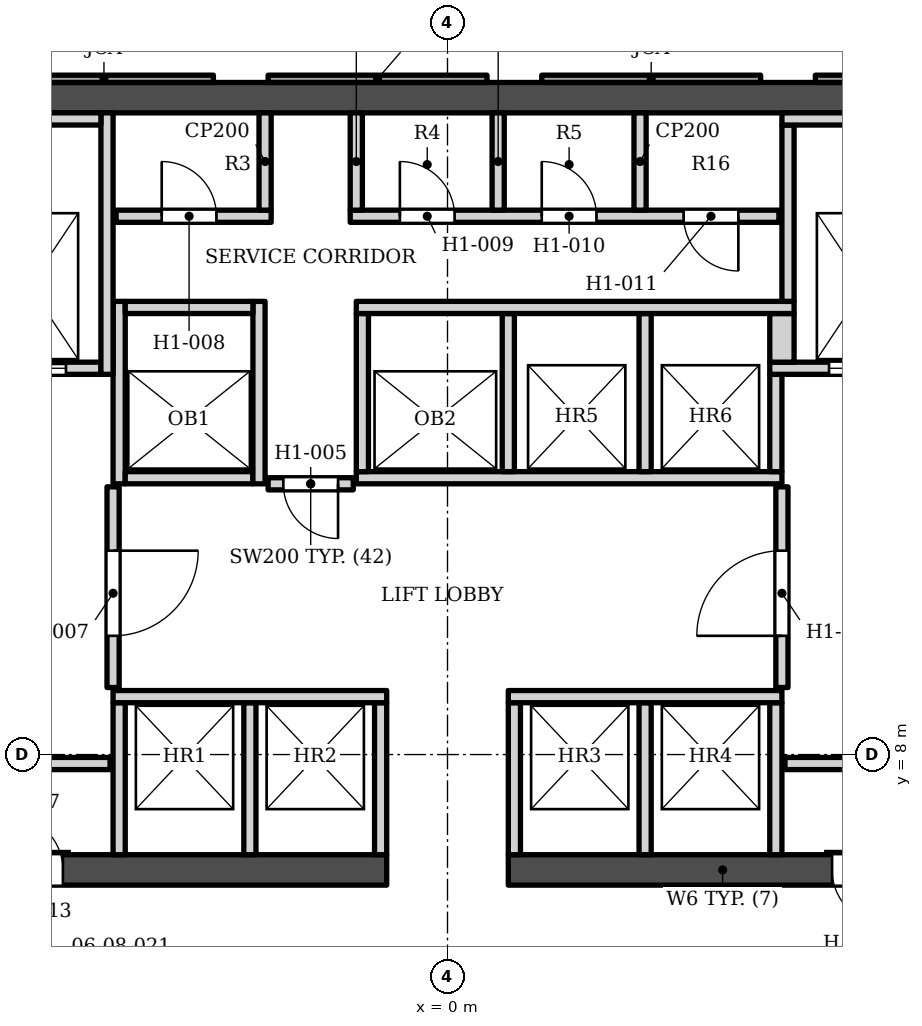
"""IFC4 building model, lengths in metres.
Left out: names, types, materials, properties, quantities, classifications, styles, units other than length and angle.
Written with IfcOpenShell. Run it as: python <this file> out.ifc"""

import sys

from ifc_helpers import new_model, si_unit, direction, frame, frame_2d, origin, place, context, subcontext, project, spatial, polyline, rectangle, outline, extrude, element, fill, save


model = new_model("IFC4")
c1 = context("Model", 3, precision=1e-05, world=origin(), true_north=direction((0.0, 1.0)))
c2 = subcontext(c1, "Body", "Model", "MODEL_VIEW")
j1 = project(units=[si_unit("LENGTHUNIT", "METRE"), si_unit("PLANEANGLEUNIT", "RADIAN")], contexts=[c1])
p1 = place(None, origin())
s1 = spatial("IfcSite", under=j1, at=p1, CompositionType="ELEMENT")
p2 = place(p1, origin())
s2 = spatial("IfcBuilding", under=s1, at=p2, CompositionType="ELEMENT")
p3 = place(p2, frame((0.0, 0.0, 46.0)))
s3 = spatial("IfcBuildingStorey", under=s2, at=p3, CompositionType="ELEMENT", Elevation=46.0)
p4 = place(p3, frame((-16.9, 18.802, 0.0), z_axis=(0.0, 0.0, 1.0), x_axis=(1.0, 0.0, 0.0)))
e1 = element("IfcWall", 1, at=p4, inside=s3, PredefinedType="SHEAR", context=c2, shape_type="SweptSolid", body=[
    extrude(rectangle(XDim=33.8, YDim=0.5, at=frame_2d((16.9, 0.0))), origin(), (0.0, 0.0, 1.0), 3.4),
])
p5 = place(p3, frame((-8.05, 6.103, 0.0), z_axis=(0.0, 0.0, 1.0), x_axis=(1.0, 0.0, 0.0)))
e2 = element("IfcWall", 2, at=p5, inside=s3, PredefinedType="SHEAR", context=c2, shape_type="SweptSolid", body=[
    extrude(rectangle(XDim=7.05, YDim=0.5, at=frame_2d((3.525, 0.0))), origin(), (0.0, 0.0, 1.0), 3.4),
])
p6 = place(p5, frame((0.825, 0.0, 0.0)))
e3 = element("IfcOpeningElement", 3, at=p6, cuts=e2, PredefinedType="OPENING", context=c2, shape_type="SweptSolid", body=[
    extrude(rectangle(XDim=0.9, YDim=2.1, at=frame_2d((0.45, 1.05))), frame((0.0, 0.26, 0.0), z_axis=(0.0, -1.0, 0.0), x_axis=(1.0, 0.0, 0.0)), (0.0, 0.0, 1.0), 0.52),
])
p7 = place(p3, frame((1.0, 6.103, 0.0), z_axis=(0.0, 0.0, 1.0), x_axis=(1.0, 0.0, 0.0)))
e4 = element("IfcWall", 4, at=p7, inside=s3, PredefinedType="SHEAR", context=c2, shape_type="SweptSolid", body=[
    extrude(rectangle(XDim=7.05, YDim=0.5, at=frame_2d((3.525, 0.0))), origin(), (0.0, 0.0, 1.0), 3.4),
])
p8 = place(p7, frame((5.325, 0.0, 0.0)))
e5 = element("IfcOpeningElement", 5, at=p8, cuts=e4, PredefinedType="OPENING", context=c2, shape_type="SweptSolid", body=[
    extrude(rectangle(XDim=0.9, YDim=2.1, at=frame_2d((0.45, 1.05))), frame((0.0, 0.26, 0.0), z_axis=(0.0, -1.0, 0.0), x_axis=(1.0, 0.0, 0.0)), (0.0, 0.0, 1.0), 0.52),
])
p9 = place(p3, origin())
e6 = element("IfcWall", 6, at=p9, inside=s3, PredefinedType="ELEMENTEDWALL", context=c2, shape_type="SweptSolid", body=[
    extrude(outline(polyline([(6.05, 19.173), (6.05, 19.052), (9.65, 19.052), (9.65, 19.173), (6.05, 19.173)])), origin(), (0.0, 0.0, 1.0), 2.65),
])
p10 = place(p3, origin())
e7 = element("IfcWall", 7, at=p10, inside=s3, PredefinedType="SOLIDWALL", context=c2, shape_type="SweptSolid", body=[
    extrude(outline(polyline([(1.55, 19.173), (1.55, 19.052), (5.15, 19.052), (5.15, 19.173), (1.55, 19.173)])), origin(), (0.0, 0.0, 1.0), 2.65),
])
p11 = place(p3, origin())
e8 = element("IfcWall", 8, at=p11, inside=s3, PredefinedType="ELEMENTEDWALL", context=c2, shape_type="SweptSolid", body=[
    extrude(outline(polyline([(-2.95, 19.173), (-2.95, 19.052), (0.65, 19.052), (0.65, 19.173), (-2.95, 19.173)])), origin(), (0.0, 0.0, 1.0), 2.65),
])
p12 = place(p3, origin())
e9 = element("IfcWall", 9, at=p12, inside=s3, PredefinedType="SOLIDWALL", context=c2, shape_type="SweptSolid", body=[
    extrude(outline(polyline([(-7.45, 19.173), (-7.45, 19.052), (-3.85, 19.052), (-3.85, 19.173), (-7.45, 19.173)])), origin(), (0.0, 0.0, 1.0), 2.65),
])
for number, where, z_axis, x_axis in (
    (10, (-5.4, 6.353, 0.0), (0.0, 0.0, 1.0), (0.0, 1.0, 0.0)),
    (11, (-3.25, 6.353, 0.0), (0.0, 0.0, 1.0), (0.0, 1.0, 0.0)),
    (12, (-1.1, 6.353, 0.0), (0.0, 0.0, 1.0), (0.0, 1.0, 0.0)),
    (13, (1.1, 6.353, 0.0), (0.0, 0.0, 1.0), (0.0, 1.0, 0.0)),
    (14, (3.25, 6.353, 0.0), (0.0, 0.0, 1.0), (0.0, 1.0, 0.0)),
    (15, (5.4, 6.353, 0.0), (0.0, 0.0, 1.0), (0.0, 1.0, 0.0)),
    (16, (-8.05, 7.853, 0.0), (0.0, 0.0, 1.0), (1.0, 0.0, 0.0)),
    (17, (5.55, 7.853, 0.0), (0.0, 0.0, 1.0), (1.0, 0.0, 0.0)),
):
    element("IfcWall", number, at=place(p3, frame(where, z_axis=z_axis, x_axis=x_axis)), inside=s3, PredefinedType="SOLIDWALL", context=c2, shape_type="SweptSolid", body=[
        extrude(rectangle(XDim=2.5, YDim=0.2, at=frame_2d((1.25, 0.0))), origin(), (0.0, 0.0, 1.0), 3.23),
    ])
for number, where, z_axis, x_axis in (
    (18, (-5.5, 8.953, 0.0), (0.0, 0.0, 1.0), (1.0, 0.0, 0.0)),
    (19, (1.0, 8.953, 0.0), (0.0, 0.0, 1.0), (1.0, 0.0, 0.0)),
):
    element("IfcWall", number, at=place(p3, frame(where, z_axis=z_axis, x_axis=x_axis)), inside=s3, PredefinedType="SOLIDWALL", context=c2, shape_type="SweptSolid", body=[
        extrude(rectangle(XDim=4.5, YDim=0.2, at=frame_2d((2.25, 0.0))), origin(), (0.0, 0.0, 1.0), 3.23),
    ])
p13 = place(p3, frame((-5.5, 9.103, 0.0), z_axis=(0.0, 0.0, 1.0), x_axis=(0.0, 1.0, 0.0)))
e20 = element("IfcWall", 20, at=p13, inside=s3, PredefinedType="SOLIDWALL", context=c2, shape_type="SweptSolid", body=[
    extrude(rectangle(XDim=3.3, YDim=0.2, at=frame_2d((1.65, 0.0))), origin(), (0.0, 0.0, 1.0), 3.23),
])
p14 = place(p13, frame((0.85, 0.0, 0.0)))
e21 = element("IfcOpeningElement", 21, at=p14, cuts=e20, PredefinedType="OPENING", context=c2, shape_type="SweptSolid", body=[
    extrude(rectangle(XDim=1.4, YDim=2.1, at=frame_2d((0.7, 1.05))), frame((0.0, 0.11, 0.0), z_axis=(0.0, -1.0, 0.0), x_axis=(1.0, 0.0, 0.0)), (0.0, 0.0, 1.0), 0.22),
])
p15 = place(p3, frame((5.5, 9.103, 0.0), z_axis=(0.0, 0.0, 1.0), x_axis=(0.0, 1.0, 0.0)))
e22 = element("IfcWall", 22, at=p15, inside=s3, PredefinedType="SOLIDWALL", context=c2, shape_type="SweptSolid", body=[
    extrude(rectangle(XDim=3.3, YDim=0.2, at=frame_2d((1.65, 0.0))), origin(), (0.0, 0.0, 1.0), 3.23),
])
p16 = place(p15, frame((0.85, 0.0, 0.0)))
e23 = element("IfcOpeningElement", 23, at=p16, cuts=e22, PredefinedType="OPENING", context=c2, shape_type="SweptSolid", body=[
    extrude(rectangle(XDim=1.4, YDim=2.1, at=frame_2d((0.7, 1.05))), frame((0.0, 0.11, 0.0), z_axis=(0.0, -1.0, 0.0), x_axis=(1.0, 0.0, 0.0)), (0.0, 0.0, 1.0), 0.22),
])
p17 = place(p3, frame((-2.95, 12.453, 0.0), z_axis=(0.0, 0.0, 1.0), x_axis=(1.0, 0.0, 0.0)))
e24 = element("IfcWall", 24, at=p17, inside=s3, PredefinedType="SOLIDWALL", context=c2, shape_type="SweptSolid", body=[
    extrude(rectangle(XDim=1.4, YDim=0.2, at=frame_2d((0.7, 0.0))), origin(), (0.0, 0.0, 1.0), 3.23),
])
p18 = place(p17, frame((0.25, 0.0, 0.0)))
e25 = element("IfcOpeningElement", 25, at=p18, cuts=e24, PredefinedType="OPENING", context=c2, shape_type="SweptSolid", body=[
    extrude(rectangle(XDim=0.9, YDim=2.1, at=frame_2d((0.45, 1.05))), frame((0.0, 0.11, 0.0), z_axis=(0.0, -1.0, 0.0), x_axis=(1.0, 0.0, 0.0)), (0.0, 0.0, 1.0), 0.22),
])
p19 = place(p3, frame((-5.4, 12.453, 0.0), z_axis=(0.0, 0.0, 1.0), x_axis=(0.0, 1.0, 0.0)))
e26 = element("IfcWall", 26, at=p19, inside=s3, PredefinedType="SOLIDWALL", context=c2, shape_type="SweptSolid", body=[
    extrude(rectangle(XDim=3.0, YDim=0.2, at=frame_2d((1.5, 0.0))), origin(), (0.0, 0.0, 1.0), 3.23),
])
p20 = place(p3, frame((-5.3, 12.552, 0.0), z_axis=(0.0, 0.0, 1.0), x_axis=(1.0, 0.0, 0.0)))
e27 = element("IfcWall", 27, at=p20, inside=s3, PredefinedType="SOLIDWALL", context=c2, shape_type="SweptSolid", body=[
    extrude(rectangle(XDim=2.1, YDim=0.2, at=frame_2d((1.05, 0.0))), origin(), (0.0, 0.0, 1.0), 3.23),
])
p21 = place(p3, frame((-3.1, 12.453, 0.0), z_axis=(0.0, 0.0, 1.0), x_axis=(0.0, 1.0, 0.0)))
e28 = element("IfcWall", 28, at=p21, inside=s3, PredefinedType="SOLIDWALL", context=c2, shape_type="SweptSolid", body=[
    extrude(rectangle(XDim=3.0, YDim=0.2, at=frame_2d((1.5, 0.0))), origin(), (0.0, 0.0, 1.0), 3.23),
])
p22 = place(p3, frame((-1.5, 12.552, 0.0), z_axis=(0.0, 0.0, 1.0), x_axis=(1.0, 0.0, 0.0)))
e29 = element("IfcWall", 29, at=p22, inside=s3, PredefinedType="SOLIDWALL", context=c2, shape_type="SweptSolid", body=[
    extrude(rectangle(XDim=7.0, YDim=0.2, at=frame_2d((3.5, 0.0))), origin(), (0.0, 0.0, 1.0), 3.23),
])
for number, where, z_axis, x_axis in (
    (30, (-1.4, 12.653, 0.0), (0.0, 0.0, 1.0), (0.0, 1.0, 0.0)),
    (31, (1.0, 12.653, 0.0), (0.0, 0.0, 1.0), (0.0, 1.0, 0.0)),
    (32, (3.25, 12.653, 0.0), (0.0, 0.0, 1.0), (0.0, 1.0, 0.0)),
):
    element("IfcWall", number, at=place(p3, frame(where, z_axis=z_axis, x_axis=x_axis)), inside=s3, PredefinedType="SOLIDWALL", context=c2, shape_type="SweptSolid", body=[
        extrude(rectangle(XDim=2.6, YDim=0.2, at=frame_2d((1.3, 0.0))), origin(), (0.0, 0.0, 1.0), 3.23),
    ])
p23 = place(p3, frame((5.4, 12.653, 0.0), z_axis=(0.0, 0.0, 1.0), x_axis=(0.0, 1.0, 0.0)))
e33 = element("IfcWall", 33, at=p23, inside=s3, PredefinedType="SOLIDWALL", context=c2, shape_type="SweptSolid", body=[
    extrude(rectangle(XDim=1.6, YDim=0.2, at=frame_2d((0.8, 0.0))), origin(), (0.0, 0.0, 1.0), 3.23),
])
p24 = place(p3, frame((-8.05, 14.353, 0.0), z_axis=(0.0, 0.0, 1.0), x_axis=(1.0, 0.0, 0.0)))
e34 = element("IfcWall", 34, at=p24, inside=s3, PredefinedType="SOLIDWALL", context=c2, shape_type="SweptSolid", body=[
    extrude(rectangle(XDim=2.35, YDim=0.2, at=frame_2d((1.175, 0.0))), origin(), (0.0, 0.0, 1.0), 3.23),
])
p25 = place(p24, frame((0.575, 0.0, 0.0)))
e35 = element("IfcOpeningElement", 35, at=p25, cuts=e34, PredefinedType="OPENING", context=c2, shape_type="SweptSolid", body=[
    extrude(rectangle(XDim=1.2, YDim=2.1, at=frame_2d((0.6, 1.05))), frame((0.0, 0.11, 0.0), z_axis=(0.0, -1.0, 0.0), x_axis=(1.0, 0.0, 0.0)), (0.0, 0.0, 1.0), 0.22),
])
p26 = place(p3, frame((-5.6, 14.253, 0.0), z_axis=(0.0, 0.0, 1.0), x_axis=(0.0, 1.0, 0.0)))
e36 = element("IfcWall", 36, at=p26, inside=s3, PredefinedType="SOLIDWALL", context=c2, shape_type="SweptSolid", body=[
    extrude(rectangle(XDim=4.3, YDim=0.2, at=frame_2d((2.15, 0.0))), origin(), (0.0, 0.0, 1.0), 3.23),
])
p27 = place(p3, frame((5.3, 14.353, 0.0), z_axis=(0.0, 0.0, 1.0), x_axis=(1.0, 0.0, 0.0)))
e37 = element("IfcWall", 37, at=p27, inside=s3, PredefinedType="SOLIDWALL", context=c2, shape_type="SweptSolid", body=[
    extrude(rectangle(XDim=2.75, YDim=0.2, at=frame_2d((1.375, 0.0))), origin(), (0.0, 0.0, 1.0), 3.23),
])
p28 = place(p27, frame((0.975, 0.0, 0.0)))
e38 = element("IfcOpeningElement", 38, at=p28, cuts=e37, PredefinedType="OPENING", context=c2, shape_type="SweptSolid", body=[
    extrude(rectangle(XDim=1.2, YDim=2.1, at=frame_2d((0.6, 1.05))), frame((0.0, 0.11, 0.0), z_axis=(0.0, -1.0, 0.0), x_axis=(1.0, 0.0, 0.0)), (0.0, 0.0, 1.0), 0.22),
])
p29 = place(p3, frame((5.5, 14.453, 0.0), z_axis=(0.0, 0.0, 1.0), x_axis=(0.0, 1.0, 0.0)))
e39 = element("IfcWall", 39, at=p29, inside=s3, PredefinedType="SOLIDWALL", context=c2, shape_type="SweptSolid", body=[
    extrude(rectangle(XDim=0.8, YDim=0.4, at=frame_2d((0.4, 0.0))), origin(), (0.0, 0.0, 1.0), 3.23),
])
p30 = place(p3, frame((-5.3, 15.353, 0.0), z_axis=(0.0, 0.0, 1.0), x_axis=(1.0, 0.0, 0.0)))
e40 = element("IfcWall", 40, at=p30, inside=s3, PredefinedType="SOLIDWALL", context=c2, shape_type="SweptSolid", body=[
    extrude(rectangle(XDim=2.1, YDim=0.2, at=frame_2d((1.05, 0.0))), origin(), (0.0, 0.0, 1.0), 3.23),
])
p31 = place(p3, frame((-1.5, 15.353, 0.0), z_axis=(0.0, 0.0, 1.0), x_axis=(1.0, 0.0, 0.0)))
e41 = element("IfcWall", 41, at=p31, inside=s3, PredefinedType="SOLIDWALL", context=c2, shape_type="SweptSolid", body=[
    extrude(rectangle(XDim=7.2, YDim=0.2, at=frame_2d((3.6, 0.0))), origin(), (0.0, 0.0, 1.0), 3.23),
])
p32 = place(p3, frame((5.6, 15.453, 0.0), z_axis=(0.0, 0.0, 1.0), x_axis=(0.0, 1.0, 0.0)))
e42 = element("IfcWall", 42, at=p32, inside=s3, PredefinedType="SOLIDWALL", context=c2, shape_type="SweptSolid", body=[
    extrude(rectangle(XDim=2.9, YDim=0.2, at=frame_2d((1.45, 0.0))), origin(), (0.0, 0.0, 1.0), 3.23),
])
p33 = place(p3, frame((-5.45, 16.853, 0.0), z_axis=(0.0, 0.0, 1.0), x_axis=(1.0, 0.0, 0.0)))
e43 = element("IfcWall", 43, at=p33, inside=s3, PredefinedType="SOLIDWALL", context=c2, shape_type="SweptSolid", body=[
    extrude(rectangle(XDim=2.55, YDim=0.2, at=frame_2d((1.275, 0.0))), origin(), (0.0, 0.0, 1.0), 3.23),
])
p34 = place(p33, frame((0.75, 0.0, 0.0)))
e44 = element("IfcOpeningElement", 44, at=p34, cuts=e43, PredefinedType="OPENING", context=c2, shape_type="SweptSolid", body=[
    extrude(rectangle(XDim=0.9, YDim=2.1, at=frame_2d((0.45, 1.05))), frame((0.0, 0.11, 0.0), z_axis=(0.0, -1.0, 0.0), x_axis=(1.0, 0.0, 0.0)), (0.0, 0.0, 1.0), 0.22),
])
p35 = place(p3, frame((-1.6, 16.853, 0.0), z_axis=(0.0, 0.0, 1.0), x_axis=(1.0, 0.0, 0.0)))
e45 = element("IfcWall", 45, at=p35, inside=s3, PredefinedType="SOLIDWALL", context=c2, shape_type="SweptSolid", body=[
    extrude(rectangle(XDim=7.05, YDim=0.2, at=frame_2d((3.525, 0.0))), origin(), (0.0, 0.0, 1.0), 3.23),
])
p36 = place(p35, frame((0.817, 0.0, 0.0)))
e46 = element("IfcOpeningElement", 46, at=p36, cuts=e45, PredefinedType="OPENING", context=c2, shape_type="SweptSolid", body=[
    extrude(rectangle(XDim=0.9, YDim=2.1, at=frame_2d((0.45, 1.05))), frame((0.0, 0.11, 0.0), z_axis=(0.0, -1.0, 0.0), x_axis=(1.0, 0.0, 0.0)), (0.0, 0.0, 1.0), 0.22),
])
p37 = place(p35, frame((3.15, 0.0, 0.0)))
e47 = element("IfcOpeningElement", 47, at=p37, cuts=e45, PredefinedType="OPENING", context=c2, shape_type="SweptSolid", body=[
    extrude(rectangle(XDim=0.9, YDim=2.1, at=frame_2d((0.45, 1.05))), frame((0.0, 0.11, 0.0), z_axis=(0.0, -1.0, 0.0), x_axis=(1.0, 0.0, 0.0)), (0.0, 0.0, 1.0), 0.22),
])
p38 = place(p35, frame((5.483, 0.0, 0.0)))
e48 = element("IfcOpeningElement", 48, at=p38, cuts=e45, PredefinedType="OPENING", context=c2, shape_type="SweptSolid", body=[
    extrude(rectangle(XDim=0.9, YDim=2.1, at=frame_2d((0.45, 1.05))), frame((0.0, 0.11, 0.0), z_axis=(0.0, -1.0, 0.0), x_axis=(1.0, 0.0, 0.0)), (0.0, 0.0, 1.0), 0.22),
])
for number, where, z_axis, x_axis in (
    (49, (-3.0, 16.953, 0.0), (0.0, 0.0, 1.0), (0.0, 1.0, 0.0)),
    (50, (-1.5, 16.953, 0.0), (0.0, 0.0, 1.0), (0.0, 1.0, 0.0)),
    (51, (0.833, 16.953, 0.0), (0.0, 0.0, 1.0), (0.0, 1.0, 0.0)),
    (52, (3.167, 16.953, 0.0), (0.0, 0.0, 1.0), (0.0, 1.0, 0.0)),
):
    element("IfcWall", number, at=place(p3, frame(where, z_axis=z_axis, x_axis=x_axis)), inside=s3, PredefinedType="PARTITIONING", context=c2, shape_type="SweptSolid", body=[
        extrude(rectangle(XDim=1.6, YDim=0.2, at=frame_2d((0.8, 0.0))), origin(), (0.0, 0.0, 1.0), 3.23),
    ])
p39 = place(p3, frame((-8.05, 18.453, 0.0), z_axis=(0.0, 0.0, 1.0), x_axis=(1.0, 0.0, 0.0)))
e53 = element("IfcWall", 53, at=p39, inside=s3, PredefinedType="SOLIDWALL", context=c2, shape_type="SweptSolid", body=[
    extrude(rectangle(XDim=2.35, YDim=0.2, at=frame_2d((1.175, 0.0))), origin(), (0.0, 0.0, 1.0), 3.23),
])
p40 = place(p3, frame((5.5, 18.453, 0.0), z_axis=(0.0, 0.0, 1.0), x_axis=(1.0, 0.0, 0.0)))
e54 = element("IfcWall", 54, at=p40, inside=s3, PredefinedType="SOLIDWALL", context=c2, shape_type="SweptSolid", body=[
    extrude(rectangle(XDim=2.55, YDim=0.2, at=frame_2d((1.275, 0.0))), origin(), (0.0, 0.0, 1.0), 3.23),
])
p41 = place(p25, origin())
e55 = element("IfcDoor", 55, at=p41, inside=s3, OperationType="DOUBLE_DOOR_SLIDING", PredefinedType="DOOR", context=c2, shape_type="SweptSolid", body=[
    extrude(rectangle(XDim=1.2, YDim=2.1, at=frame_2d((0.6, 1.05))), frame((0.0, 0.025, 0.0), z_axis=(0.0, -1.0, 0.0), x_axis=(1.0, 0.0, 0.0)), (0.0, 0.0, 1.0), 0.05),
])
fill(e35, e55)
p42 = place(p28, origin())
e56 = element("IfcDoor", 56, at=p42, inside=s3, OperationType="DOUBLE_DOOR_SLIDING", PredefinedType="DOOR", context=c2, shape_type="SweptSolid", body=[
    extrude(rectangle(XDim=1.2, YDim=2.1, at=frame_2d((0.6, 1.05))), frame((0.0, 0.025, 0.0), z_axis=(0.0, -1.0, 0.0), x_axis=(1.0, 0.0, 0.0)), (0.0, 0.0, 1.0), 0.05),
])
fill(e38, e56)
p43 = place(p18, origin())
e57 = element("IfcDoor", 57, at=p43, inside=s3, OperationType="SINGLE_SWING_RIGHT", PredefinedType="DOOR", context=c2, shape_type="SweptSolid", body=[
    extrude(rectangle(XDim=0.9, YDim=2.1, at=frame_2d((0.45, 1.05))), frame((0.0, 0.025, 0.0), z_axis=(0.0, -1.0, 0.0), x_axis=(1.0, 0.0, 0.0)), (0.0, 0.0, 1.0), 0.05),
])
fill(e25, e57)
p44 = place(p14, origin())
e58 = element("IfcDoor", 58, at=p44, inside=s3, OperationType="SINGLE_SWING_RIGHT", PredefinedType="DOOR", context=c2, shape_type="SweptSolid", body=[
    extrude(rectangle(XDim=1.4, YDim=2.1, at=frame_2d((0.7, 1.05))), frame((0.0, 0.025, 0.0), z_axis=(0.0, -1.0, 0.0), x_axis=(1.0, 0.0, 0.0)), (0.0, 0.0, 1.0), 0.05),
])
fill(e21, e58)
p45 = place(p16, origin())
e59 = element("IfcDoor", 59, at=p45, inside=s3, OperationType="SINGLE_SWING_LEFT", PredefinedType="DOOR", context=c2, shape_type="SweptSolid", body=[
    extrude(rectangle(XDim=1.4, YDim=2.1, at=frame_2d((0.7, 1.05))), frame((0.0, 0.025, 0.0), z_axis=(0.0, -1.0, 0.0), x_axis=(1.0, 0.0, 0.0)), (0.0, 0.0, 1.0), 0.05),
])
fill(e23, e59)
p46 = place(p34, origin())
e60 = element("IfcDoor", 60, at=p46, inside=s3, OperationType="SINGLE_SWING_LEFT", PredefinedType="DOOR", context=c2, shape_type="SweptSolid", body=[
    extrude(rectangle(XDim=0.9, YDim=2.1, at=frame_2d((0.45, 1.05))), frame((0.0, 0.025, 0.0), z_axis=(0.0, -1.0, 0.0), x_axis=(1.0, 0.0, 0.0)), (0.0, 0.0, 1.0), 0.05),
])
fill(e44, e60)
p47 = place(p36, origin())
e61 = element("IfcDoor", 61, at=p47, inside=s3, OperationType="SINGLE_SWING_LEFT", PredefinedType="DOOR", context=c2, shape_type="SweptSolid", body=[
    extrude(rectangle(XDim=0.9, YDim=2.1, at=frame_2d((0.45, 1.05))), frame((0.0, 0.025, 0.0), z_axis=(0.0, -1.0, 0.0), x_axis=(1.0, 0.0, 0.0)), (0.0, 0.0, 1.0), 0.05),
])
fill(e46, e61)
p48 = place(p37, origin())
e62 = element("IfcDoor", 62, at=p48, inside=s3, OperationType="SINGLE_SWING_LEFT", PredefinedType="DOOR", context=c2, shape_type="SweptSolid", body=[
    extrude(rectangle(XDim=0.9, YDim=2.1, at=frame_2d((0.45, 1.05))), frame((0.0, 0.025, 0.0), z_axis=(0.0, -1.0, 0.0), x_axis=(1.0, 0.0, 0.0)), (0.0, 0.0, 1.0), 0.05),
])
fill(e47, e62)
p49 = place(p38, origin())
e63 = element("IfcDoor", 63, at=p49, inside=s3, OperationType="SINGLE_SWING_RIGHT", PredefinedType="DOOR", context=c2, shape_type="SweptSolid", body=[
    extrude(rectangle(XDim=0.9, YDim=2.1, at=frame_2d((0.45, 1.05))), frame((0.0, 0.025, 0.0), z_axis=(0.0, -1.0, 0.0), x_axis=(1.0, 0.0, 0.0)), (0.0, 0.0, 1.0), 0.05),
])
fill(e48, e63)
p50 = place(p6, origin())
e64 = element("IfcDoor", 64, at=p50, inside=s3, OperationType="SINGLE_SWING_LEFT", PredefinedType="DOOR", context=c2, shape_type="SweptSolid", body=[
    extrude(rectangle(XDim=0.9, YDim=2.1, at=frame_2d((0.45, 1.05))), frame((0.0, 0.025, 0.0), z_axis=(0.0, -1.0, 0.0), x_axis=(1.0, 0.0, 0.0)), (0.0, 0.0, 1.0), 0.05),
])
fill(e3, e64)
p51 = place(p8, origin())
e65 = element("IfcDoor", 65, at=p51, inside=s3, OperationType="SINGLE_SWING_RIGHT", PredefinedType="DOOR", context=c2, shape_type="SweptSolid", body=[
    extrude(rectangle(XDim=0.9, YDim=2.1, at=frame_2d((0.45, 1.05))), frame((0.0, 0.025, 0.0), z_axis=(0.0, -1.0, 0.0), x_axis=(1.0, 0.0, 0.0)), (0.0, 0.0, 1.0), 0.05),
])
fill(e5, e65)
save(model, sys.argv[1])
